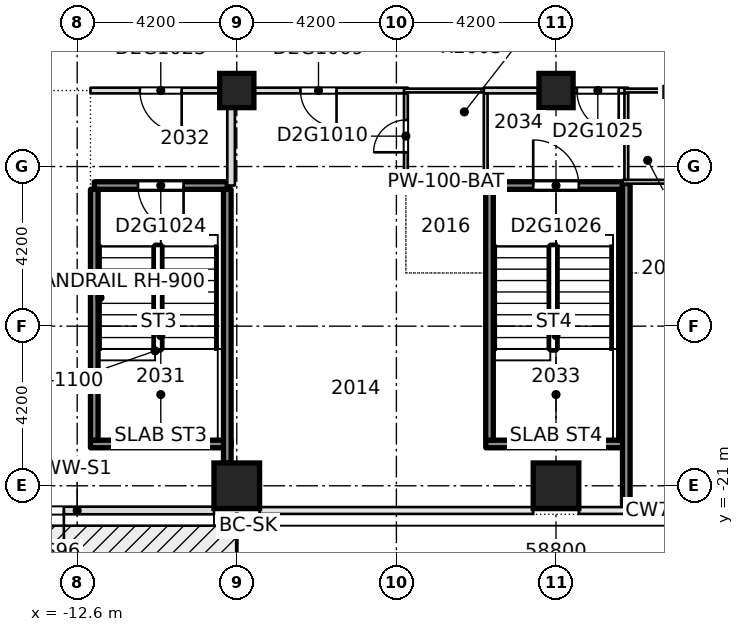
"""IFC4 building model, lengths in metres.
Left out: names, types, materials, properties, quantities, classifications, styles, units other than length and angle.
Written with IfcOpenShell. Run it as: python <this file> out.ifc"""

import sys

from ifc_helpers import new_model, si_unit, direction, frame, frame_2d, origin, origin_2d, place, context, subcontext, project, spatial, rectangle, extrude, element, fill, save


model = new_model("IFC4")
c1 = context("Model", 3, precision=1e-05, world=origin(), true_north=direction((0.0, 1.0)))
c2 = subcontext(c1, "Body", "Model", "MODEL_VIEW")
j1 = project(units=[si_unit("LENGTHUNIT", "METRE"), si_unit("PLANEANGLEUNIT", "RADIAN")], contexts=[c1])
p1 = place(None, origin())
s1 = spatial("IfcSite", under=j1, at=p1, CompositionType="ELEMENT")
p2 = place(p1, origin())
s2 = spatial("IfcBuilding", under=s1, at=p2, CompositionType="ELEMENT")
p3 = place(p2, frame((0.0, 0.0, 83.85)))
s3 = spatial("IfcBuildingStorey", under=s2, at=p3, CompositionType="ELEMENT", Elevation=83.85)
for number, where, z_axis, x_axis in (
    (1, (-8.4, -21.0, -0.32), (0.0, 0.0, 1.0), (1.0, 0.0, 0.0)),
    (2, (0.0, -21.0, -0.32), (0.0, 0.0, 1.0), (1.0, 0.0, 0.0)),
):
    element("IfcColumn", number, at=place(p3, frame(where, z_axis=z_axis, x_axis=x_axis)), inside=s3, PredefinedType="COLUMN", context=c2, shape_type="SweptSolid", body=[
        extrude(rectangle(XDim=1.2, YDim=1.2, at=origin_2d()), origin(), (0.0, 0.0, 1.0), 3.45),
    ])
for number, where, z_axis, x_axis in (
    (3, (-8.4, -10.6, -0.32), (0.0, 0.0, 1.0), (1.0, 0.0, 0.0)),
    (4, (0.0, -10.6, -0.32), (0.0, 0.0, 1.0), (1.0, 0.0, 0.0)),
):
    element("IfcColumn", number, at=place(p3, frame(where, z_axis=z_axis, x_axis=x_axis)), inside=s3, PredefinedType="COLUMN", context=c2, shape_type="SweptSolid", body=[
        extrude(rectangle(XDim=0.9, YDim=0.9, at=origin_2d()), origin(), (0.0, 0.0, 1.0), 3.45),
    ])
p4 = place(p3, frame((-1.848, -19.9, 0.0), z_axis=(0.0, 0.0, 1.0), x_axis=(1.0, 0.0, 0.0)))
e5 = element("IfcWall", 5, at=p4, inside=s3, PredefinedType="SOLIDWALL", context=c2, shape_type="SweptSolid", body=[
    extrude(rectangle(XDim=3.696, YDim=0.2, at=frame_2d((1.848, 0.0))), origin(), (0.0, 0.0, 1.0), 3.13),
])
p5 = place(p3, frame((-12.15, -13.1, 0.0), z_axis=(0.0, 0.0, 1.0), x_axis=(1.0, 0.0, 0.0)))
e6 = element("IfcWall", 6, at=p5, inside=s3, PredefinedType="SOLIDWALL", context=c2, shape_type="SweptSolid", body=[
    extrude(rectangle(XDim=3.5, YDim=0.2, at=frame_2d((1.75, 0.0))), origin(), (0.0, 0.0, 1.0), 3.13),
])
p6 = place(p5, frame((1.15, 0.0, 0.0)))
e7 = element("IfcOpeningElement", 7, at=p6, cuts=e6, PredefinedType="OPENING", context=c2, shape_type="SweptSolid", body=[
    extrude(rectangle(XDim=1.2, YDim=2.1, at=frame_2d((0.6, 1.05))), frame((0.0, 0.11, 0.0), z_axis=(0.0, -1.0, 0.0), x_axis=(1.0, 0.0, 0.0)), (0.0, 0.0, 1.0), 0.22),
])
p7 = place(p3, frame((-1.848, -13.1, 0.0), z_axis=(0.0, 0.0, 1.0), x_axis=(1.0, 0.0, 0.0)))
e8 = element("IfcWall", 8, at=p7, inside=s3, PredefinedType="SOLIDWALL", context=c2, shape_type="SweptSolid", body=[
    extrude(rectangle(XDim=3.596, YDim=0.2, at=frame_2d((1.798, 0.0))), origin(), (0.0, 0.0, 1.0), 3.13),
])
p8 = place(p7, frame((1.248, 0.0, 0.0)))
e9 = element("IfcOpeningElement", 9, at=p8, cuts=e8, PredefinedType="OPENING", context=c2, shape_type="SweptSolid", body=[
    extrude(rectangle(XDim=1.2, YDim=2.1, at=frame_2d((0.6, 1.05))), frame((0.0, 0.11, 0.0), z_axis=(0.0, -1.0, 0.0), x_axis=(1.0, 0.0, 0.0)), (0.0, 0.0, 1.0), 0.22),
])
p9 = place(p3, frame((-4.0, -13.0, 0.0), z_axis=(0.0, 0.0, 1.0), x_axis=(1.0, 0.0, 0.0)))
e10 = element("IfcWall", 10, at=p9, inside=s3, PredefinedType="PARTITIONING", context=c2, shape_type="SweptSolid", body=[
    extrude(rectangle(XDim=2.2, YDim=0.1, at=frame_2d((1.1, 0.0))), origin(), (0.0, 0.0, 1.0), 3.13),
])
p10 = place(p3, frame((1.75, -13.0, 0.0), z_axis=(0.0, 0.0, 1.0), x_axis=(1.0, 0.0, 0.0)))
e11 = element("IfcWall", 11, at=p10, inside=s3, PredefinedType="PARTITIONING", context=c2, shape_type="SweptSolid", body=[
    extrude(rectangle(XDim=2.25, YDim=0.1, at=frame_2d((1.125, 0.0))), origin(), (0.0, 0.0, 1.0), 3.13),
])
p11 = place(p3, frame((-12.25, -10.6, 0.0), z_axis=(0.0, 0.0, 1.0), x_axis=(1.0, 0.0, 0.0)))
e12 = element("IfcWall", 12, at=p11, inside=s3, PredefinedType="PARTITIONING", context=c2, shape_type="SweptSolid", body=[
    extrude(rectangle(XDim=8.35, YDim=0.15, at=frame_2d((4.175, 0.0))), origin(), (0.0, 0.0, 1.0), 3.13),
])
p12 = place(p11, frame((5.525, 0.0, 0.0)))
e13 = element("IfcOpeningElement", 13, at=p12, cuts=e12, PredefinedType="OPENING", context=c2, shape_type="SweptSolid", body=[
    extrude(rectangle(XDim=0.95, YDim=2.1, at=frame_2d((0.475, 1.05))), frame((0.0, 0.085, 0.0), z_axis=(0.0, -1.0, 0.0), x_axis=(1.0, 0.0, 0.0)), (0.0, 0.0, 1.0), 0.17),
])
p13 = place(p11, frame((1.3, 0.0, 0.0)))
e14 = element("IfcOpeningElement", 14, at=p13, cuts=e12, PredefinedType="OPENING", context=c2, shape_type="SweptSolid", body=[
    extrude(rectangle(XDim=1.1, YDim=2.1, at=frame_2d((0.55, 1.05))), frame((0.0, 0.085, 0.0), z_axis=(0.0, -1.0, 0.0), x_axis=(1.0, 0.0, 0.0)), (0.0, 0.0, 1.0), 0.17),
])
p14 = place(p3, frame((-4.0, -10.6, 0.0), z_axis=(0.0, 0.0, 1.0), x_axis=(1.0, 0.0, 0.0)))
e15 = element("IfcWall", 15, at=p14, inside=s3, PredefinedType="PARTITIONING", context=c2, shape_type="SweptSolid", body=[
    extrude(rectangle(XDim=2.2, YDim=0.1, at=frame_2d((1.1, 0.0))), origin(), (0.0, 0.0, 1.0), 3.13),
])
p15 = place(p3, frame((-1.9, -10.6, 0.0), z_axis=(0.0, 0.0, 1.0), x_axis=(1.0, 0.0, 0.0)))
e16 = element("IfcWall", 16, at=p15, inside=s3, PredefinedType="PARTITIONING", context=c2, shape_type="SweptSolid", body=[
    extrude(rectangle(XDim=3.8, YDim=0.15, at=frame_2d((1.9, 0.0))), origin(), (0.0, 0.0, 1.0), 3.13),
])
p16 = place(p15, frame((2.45, 0.0, 0.0)))
e17 = element("IfcOpeningElement", 17, at=p16, cuts=e16, PredefinedType="OPENING", context=c2, shape_type="SweptSolid", body=[
    extrude(rectangle(XDim=1.1, YDim=2.1, at=frame_2d((0.55, 1.05))), frame((0.0, 0.085, 0.0), z_axis=(0.0, -1.0, 0.0), x_axis=(1.0, 0.0, 0.0)), (0.0, 0.0, 1.0), 0.17),
])
p17 = place(p3, frame((1.8, -10.6, 0.0), z_axis=(0.0, 0.0, 1.0), x_axis=(1.0, 0.0, 0.0)))
e18 = element("IfcWall", 18, at=p17, inside=s3, PredefinedType="PARTITIONING", context=c2, shape_type="SweptSolid", body=[
    extrude(rectangle(XDim=2.2, YDim=0.1, at=frame_2d((1.1, 0.0))), origin(), (0.0, 0.0, 1.0), 3.13),
])
p18 = place(p3, frame((-8.55, -13.1, 0.0), z_axis=(0.0, 0.0, 1.0), x_axis=(0.0, 1.0, 0.0)))
e19 = element("IfcWall", 19, at=p18, inside=s3, PredefinedType="PARTITIONING", context=c2, shape_type="SweptSolid", body=[
    extrude(rectangle(XDim=2.425, YDim=0.2, at=frame_2d((1.212, 0.0))), origin(), (0.0, 0.0, 1.0), 3.13),
])
p19 = place(p3, frame((-3.95, -12.95, 0.0), z_axis=(0.0, 0.0, 1.0), x_axis=(0.0, 1.0, 0.0)))
e20 = element("IfcWall", 20, at=p19, inside=s3, PredefinedType="PARTITIONING", context=c2, shape_type="SweptSolid", body=[
    extrude(rectangle(XDim=2.275, YDim=0.1, at=frame_2d((1.137, 0.0))), origin(), (0.0, 0.0, 1.0), 3.13),
])
p20 = place(p19, frame((0.725, 0.0, 0.0)))
e21 = element("IfcOpeningElement", 21, at=p20, cuts=e20, PredefinedType="OPENING", context=c2, shape_type="SweptSolid", body=[
    extrude(rectangle(XDim=0.85, YDim=2.1, at=frame_2d((0.425, 1.05))), frame((0.0, 0.06, 0.0), z_axis=(0.0, -1.0, 0.0), x_axis=(1.0, 0.0, 0.0)), (0.0, 0.0, 1.0), 0.12),
])
p21 = place(p3, frame((-1.85, -12.95, 0.0), z_axis=(0.0, 0.0, 1.0), x_axis=(0.0, 1.0, 0.0)))
e22 = element("IfcWall", 22, at=p21, inside=s3, PredefinedType="PARTITIONING", context=c2, shape_type="SweptSolid", body=[
    extrude(rectangle(XDim=2.275, YDim=0.1, at=frame_2d((1.137, 0.0))), origin(), (0.0, 0.0, 1.0), 3.13),
])
for number, where, z_axis, x_axis in (
    (23, (-1.75, -19.798, 0.0), (0.0, 0.0, 1.0), (0.0, 1.0, 0.0)),
    (24, (1.75, -19.798, 0.0), (0.0, 0.0, 1.0), (0.0, 1.0, 0.0)),
):
    element("IfcWall", number, at=place(p3, frame(where, z_axis=z_axis, x_axis=x_axis)), inside=s3, PredefinedType="SOLIDWALL", context=c2, shape_type="SweptSolid", body=[
        extrude(rectangle(XDim=6.596, YDim=0.2, at=frame_2d((3.298, 0.0))), origin(), (0.0, 0.0, 1.0), 3.13),
    ])
p22 = place(p3, frame((1.85, -12.95, 0.0), z_axis=(0.0, 0.0, 1.0), x_axis=(0.0, 1.0, 0.0)))
e25 = element("IfcWall", 25, at=p22, inside=s3, PredefinedType="PARTITIONING", context=c2, shape_type="SweptSolid", body=[
    extrude(rectangle(XDim=2.275, YDim=0.1, at=frame_2d((1.137, 0.0))), origin(), (0.0, 0.0, 1.0), 3.13),
])
p23 = place(p3, frame((-16.2, -21.65, 0.0), z_axis=(0.0, 0.0, 1.0), x_axis=(1.0, 0.0, 0.0)))
e26 = element("IfcWall", 26, at=p23, inside=s3, PredefinedType="STANDARD", context=c2, shape_type="SweptSolid", body=[
    extrude(rectangle(XDim=7.2, YDim=0.2, at=frame_2d((3.6, 0.0))), origin(), (0.0, 0.0, 1.0), 3.13),
])
p24 = place(p23, frame((0.35, 0.0, 0.2)))
e27 = element("IfcOpeningElement", 27, at=p24, cuts=e26, PredefinedType="OPENING", context=c2, shape_type="SweptSolid", body=[
    extrude(rectangle(XDim=1.8, YDim=2.65, at=frame_2d((0.9, 1.325))), frame((0.0, 0.11, 0.0), z_axis=(0.0, -1.0, 0.0), x_axis=(1.0, 0.0, 0.0)), (0.0, 0.0, 1.0), 0.22),
])
p25 = place(p23, frame((2.25, 0.0, 0.0)))
e28 = element("IfcOpeningElement", 28, at=p25, cuts=e26, PredefinedType="OPENING", context=c2, shape_type="SweptSolid", body=[
    extrude(rectangle(XDim=1.0, YDim=2.4, at=frame_2d((0.5, 1.2))), frame((0.0, 0.11, 0.0), z_axis=(0.0, -1.0, 0.0), x_axis=(1.0, 0.0, 0.0)), (0.0, 0.0, 1.0), 0.22),
])
p26 = place(p3, frame((-12.25, -19.9, 0.0), z_axis=(0.0, 0.0, 1.0), x_axis=(1.0, 0.0, 0.0)))
e29 = element("IfcWall", 29, at=p26, inside=s3, PredefinedType="SOLIDWALL", context=c2, shape_type="SweptSolid", body=[
    extrude(rectangle(XDim=3.7, YDim=0.2, at=frame_2d((1.85, 0.0))), origin(), (0.0, 0.0, 1.0), 3.13),
])
p27 = place(p3, frame((-12.15, -19.8, 0.0), z_axis=(0.0, 0.0, 1.0), x_axis=(0.0, 1.0, 0.0)))
e30 = element("IfcWall", 30, at=p27, inside=s3, PredefinedType="SOLIDWALL", context=c2, shape_type="SweptSolid", body=[
    extrude(rectangle(XDim=6.6, YDim=0.2, at=frame_2d((3.3, 0.0))), origin(), (0.0, 0.0, 1.0), 3.13),
])
p28 = place(p3, frame((-8.65, -20.4, 0.0), z_axis=(0.0, 0.0, 1.0), x_axis=(0.0, 1.0, 0.0)))
e31 = element("IfcWall", 31, at=p28, inside=s3, PredefinedType="SOLIDWALL", context=c2, shape_type="SweptSolid", body=[
    extrude(rectangle(XDim=7.2, YDim=0.2, at=frame_2d((3.6, 0.0))), origin(), (0.0, 0.0, 1.0), 3.13),
])
p29 = place(p3, frame((1.85, -21.55, 0.0), z_axis=(0.0, 0.0, 1.0), x_axis=(0.0, 1.0, 0.0)))
e32 = element("IfcWall", 32, at=p29, inside=s3, PredefinedType="SOLIDWALL", context=c2, shape_type="SweptSolid", body=[
    extrude(rectangle(XDim=8.5, YDim=0.2, at=frame_2d((4.25, 0.0))), origin(), (0.0, 0.0, 1.0), 3.13),
])
p30 = place(p12, origin())
e33 = element("IfcDoor", 33, at=p30, inside=s3, OperationType="SINGLE_SWING_LEFT", PredefinedType="DOOR", context=c2, shape_type="SweptSolid", body=[
    extrude(rectangle(XDim=0.95, YDim=2.1, at=frame_2d((0.475, 1.05))), frame((0.0, 0.025, 0.0), z_axis=(0.0, -1.0, 0.0), x_axis=(1.0, 0.0, 0.0)), (0.0, 0.0, 1.0), 0.05),
])
fill(e13, e33)
p31 = place(p20, origin())
e34 = element("IfcDoor", 34, at=p31, inside=s3, OperationType="SINGLE_SWING_RIGHT", PredefinedType="DOOR", context=c2, shape_type="SweptSolid", body=[
    extrude(rectangle(XDim=0.85, YDim=2.1, at=frame_2d((0.425, 1.05))), frame((0.0, 0.025, 0.0), z_axis=(0.0, -1.0, 0.0), x_axis=(1.0, 0.0, 0.0)), (0.0, 0.0, 1.0), 0.05),
])
fill(e21, e34)
p32 = place(p13, origin())
e35 = element("IfcDoor", 35, at=p32, inside=s3, OperationType="SINGLE_SWING_RIGHT", PredefinedType="DOOR", context=c2, shape_type="SweptSolid", body=[
    extrude(rectangle(XDim=1.1, YDim=2.1, at=frame_2d((0.55, 1.05))), frame((0.0, 0.025, 0.0), z_axis=(0.0, -1.0, 0.0), x_axis=(1.0, 0.0, 0.0)), (0.0, 0.0, 1.0), 0.05),
])
fill(e14, e35)
p33 = place(p6, origin())
e36 = element("IfcDoor", 36, at=p33, inside=s3, OperationType="SINGLE_SWING_RIGHT", PredefinedType="DOOR", context=c2, shape_type="SweptSolid", body=[
    extrude(rectangle(XDim=1.2, YDim=2.1, at=frame_2d((0.6, 1.05))), frame((0.0, 0.025, 0.0), z_axis=(0.0, -1.0, 0.0), x_axis=(1.0, 0.0, 0.0)), (0.0, 0.0, 1.0), 0.05),
])
fill(e7, e36)
p34 = place(p16, origin())
e37 = element("IfcDoor", 37, at=p34, inside=s3, OperationType="SINGLE_SWING_LEFT", PredefinedType="DOOR", context=c2, shape_type="SweptSolid", body=[
    extrude(rectangle(XDim=1.1, YDim=2.1, at=frame_2d((0.55, 1.05))), frame((0.0, 0.025, 0.0), z_axis=(0.0, -1.0, 0.0), x_axis=(1.0, 0.0, 0.0)), (0.0, 0.0, 1.0), 0.05),
])
fill(e17, e37)
p35 = place(p8, origin())
e38 = element("IfcDoor", 38, at=p35, inside=s3, OperationType="SINGLE_SWING_RIGHT", PredefinedType="DOOR", context=c2, shape_type="SweptSolid", body=[
    extrude(rectangle(XDim=1.2, YDim=2.1, at=frame_2d((0.6, 1.05))), frame((0.0, 0.025, 0.0), z_axis=(0.0, -1.0, 0.0), x_axis=(1.0, 0.0, 0.0)), (0.0, 0.0, 1.0), 0.05),
])
fill(e9, e38)
p36 = place(p25, origin())
e39 = element("IfcDoor", 39, at=p36, inside=s3, OperationType="SINGLE_SWING_LEFT", PredefinedType="DOOR", context=c2, shape_type="SweptSolid", body=[
    extrude(rectangle(XDim=1.0, YDim=2.4, at=frame_2d((0.5, 1.2))), frame((0.0, 0.025, 0.0), z_axis=(0.0, -1.0, 0.0), x_axis=(1.0, 0.0, 0.0)), (0.0, 0.0, 1.0), 0.05),
])
fill(e28, e39)
save(model, sys.argv[1])
